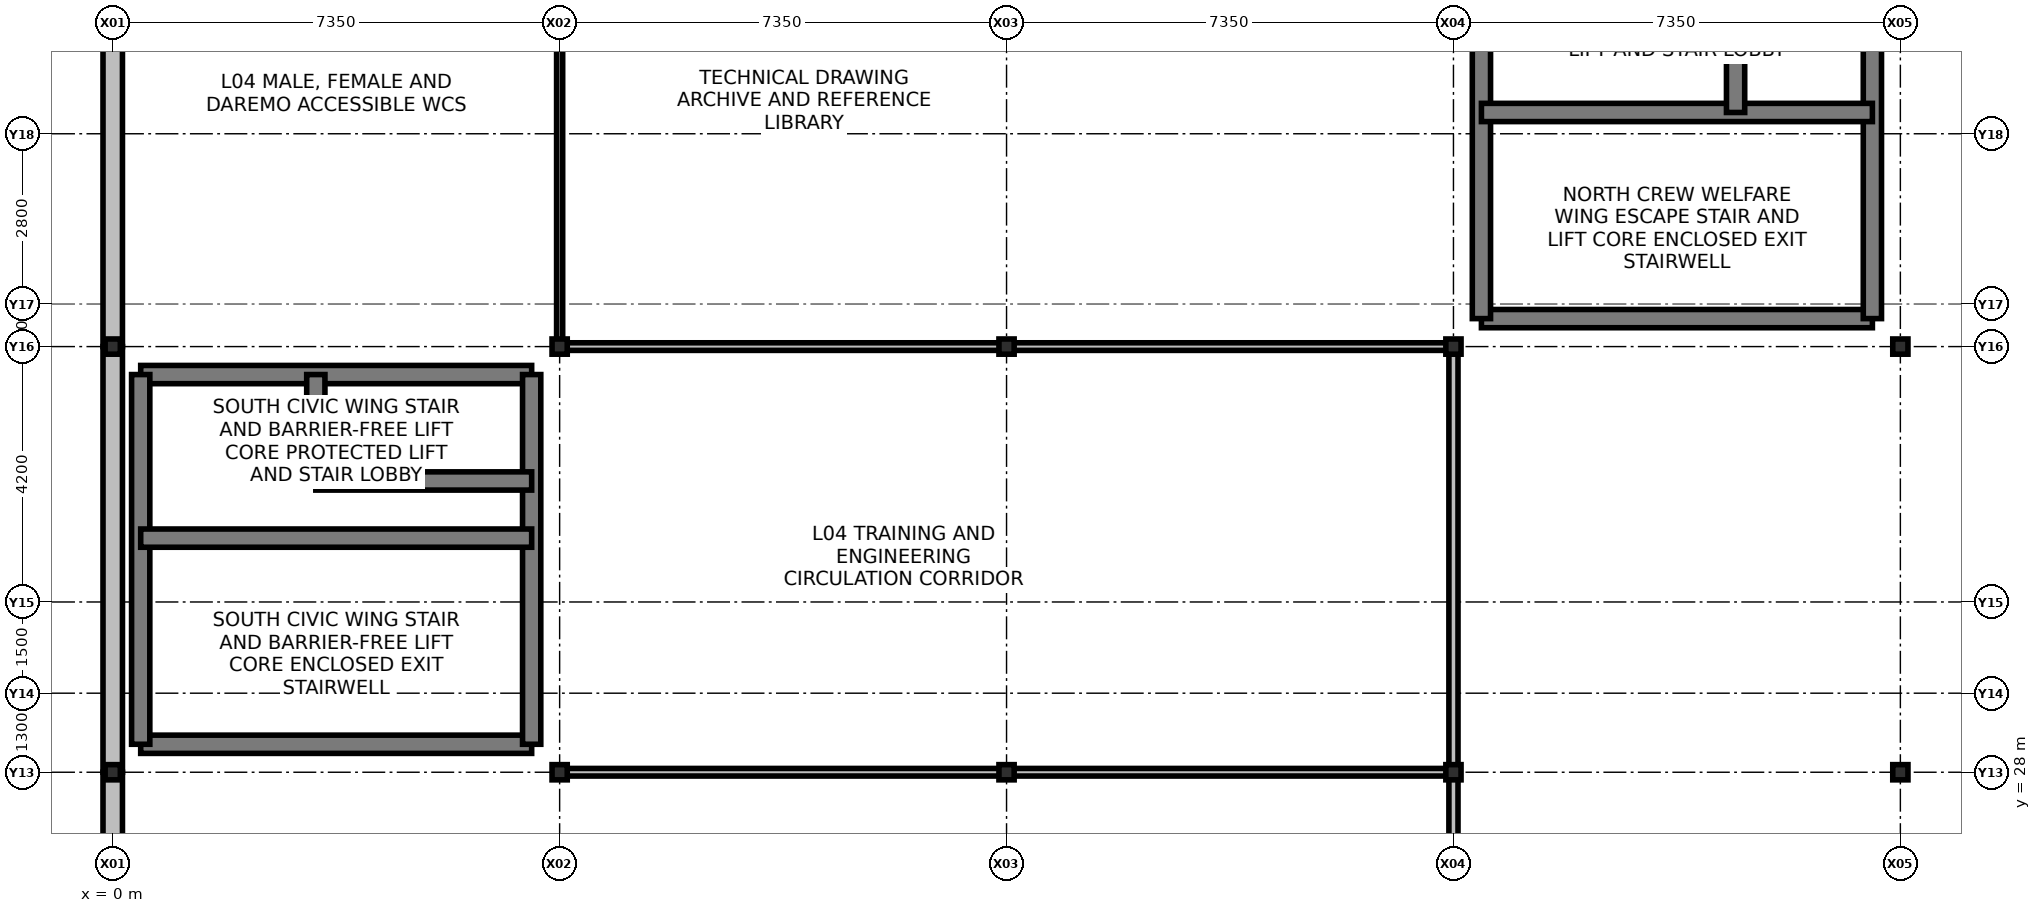
"""IFC4 building model, lengths in metres.
Left out: names, types, materials, properties, quantities, classifications, styles, units other than length and angle.
Written with IfcOpenShell. Run it as: python <this file> out.ifc"""

import sys

from ifc_helpers import new_model, si_unit, direction, frame, frame_2d, origin, origin_2d, place, context, subcontext, project, spatial, rectangle, i_section, extrude, element, fill, save


model = new_model("IFC4")
c1 = context("Model", 3, precision=1e-05, world=origin(), true_north=direction((0.0, 1.0)))
c2 = subcontext(c1, "Body", "Model", "MODEL_VIEW")
j1 = project(units=[si_unit("LENGTHUNIT", "METRE"), si_unit("PLANEANGLEUNIT", "RADIAN")], contexts=[c1])
p1 = place(None, origin())
s1 = spatial("IfcSite", under=j1, at=p1, CompositionType="ELEMENT")
p2 = place(p1, origin())
s2 = spatial("IfcBuilding", under=s1, at=p2, CompositionType="ELEMENT")
p3 = place(p2, frame((0.0, 0.0, 15.3)))
s3 = spatial("IfcBuildingStorey", under=s2, at=p3, CompositionType="ELEMENT", Elevation=15.3)
for number, where, z_axis, x_axis in (
    (1, (0.0, 28.0, 0.0), (0.0, 0.0, 1.0), (1.0, 0.0, 0.0)),
    (2, (0.0, 35.0, 0.0), (0.0, 0.0, 1.0), (1.0, 0.0, 0.0)),
    (3, (7.35, 28.0, 0.0), (0.0, 0.0, 1.0), (1.0, 0.0, 0.0)),
    (4, (7.35, 35.0, 0.0), (0.0, 0.0, 1.0), (1.0, 0.0, 0.0)),
    (5, (14.7, 28.0, 0.0), (0.0, 0.0, 1.0), (1.0, 0.0, 0.0)),
    (6, (14.7, 35.0, 0.0), (0.0, 0.0, 1.0), (1.0, 0.0, 0.0)),
    (7, (22.05, 28.0, 0.0), (0.0, 0.0, 1.0), (1.0, 0.0, 0.0)),
    (8, (22.05, 35.0, 0.0), (0.0, 0.0, 1.0), (1.0, 0.0, 0.0)),
    (9, (29.4, 28.0, 0.0), (0.0, 0.0, 1.0), (1.0, 0.0, 0.0)),
    (10, (29.4, 35.0, 0.0), (0.0, 0.0, 1.0), (1.0, 0.0, 0.0)),
):
    element("IfcColumn", number, at=place(p3, frame(where, z_axis=z_axis, x_axis=x_axis)), inside=s3, PredefinedType="COLUMN", context=c2, shape_type="SweptSolid", body=[
        extrude(i_section(OverallWidth=0.25, OverallDepth=0.25, WebThickness=0.009, FlangeThickness=0.014, at=origin_2d()), origin(), (0.0, 0.0, 1.0), 4.2),
    ])
p4 = place(p3, frame((0.0, 21.0, 0.0), z_axis=(0.0, 0.0, 1.0), x_axis=(0.0, 1.0, 0.0)))
e11 = element("IfcWall", 11, at=p4, inside=s3, PredefinedType="SOLIDWALL", context=c2, shape_type="SweptSolid", body=[
    extrude(rectangle(XDim=7.0, YDim=0.32, at=frame_2d((3.5, 0.0))), origin(), (0.0, 0.0, 1.0), 3.45),
])
p5 = place(p4, frame((2.2, 0.0, 0.9)))
e12 = element("IfcOpeningElement", 12, at=p5, cuts=e11, PredefinedType="OPENING", context=c2, shape_type="SweptSolid", body=[
    extrude(rectangle(XDim=2.0, YDim=1.8, at=frame_2d((1.0, 0.9))), frame((0.0, 0.17, 0.0), z_axis=(0.0, -1.0, 0.0), x_axis=(1.0, 0.0, 0.0)), (0.0, 0.0, 1.0), 0.34),
])
p6 = place(p3, frame((0.0, 28.0, 0.0), z_axis=(0.0, 0.0, 1.0), x_axis=(0.0, 1.0, 0.0)))
e13 = element("IfcWall", 13, at=p6, inside=s3, PredefinedType="SOLIDWALL", context=c2, shape_type="SweptSolid", body=[
    extrude(rectangle(XDim=7.0, YDim=0.32, at=frame_2d((3.5, 0.0))), origin(), (0.0, 0.0, 1.0), 3.45),
])
p7 = place(p6, frame((2.2, 0.0, 0.9)))
e14 = element("IfcOpeningElement", 14, at=p7, cuts=e13, PredefinedType="OPENING", context=c2, shape_type="SweptSolid", body=[
    extrude(rectangle(XDim=2.8, YDim=2.1, at=frame_2d((1.4, 1.05))), frame((0.0, 0.17, 0.0), z_axis=(0.0, -1.0, 0.0), x_axis=(1.0, 0.0, 0.0)), (0.0, 0.0, 1.0), 0.34),
])
p8 = place(p3, frame((0.0, 35.0, 0.0), z_axis=(0.0, 0.0, 1.0), x_axis=(0.0, 1.0, 0.0)))
e15 = element("IfcWall", 15, at=p8, inside=s3, PredefinedType="SOLIDWALL", context=c2, shape_type="SweptSolid", body=[
    extrude(rectangle(XDim=7.0, YDim=0.32, at=frame_2d((3.5, 0.0))), origin(), (0.0, 0.0, 1.0), 3.45),
])
p9 = place(p8, frame((2.2, 0.0, 0.9)))
e16 = element("IfcOpeningElement", 16, at=p9, cuts=e15, PredefinedType="OPENING", context=c2, shape_type="SweptSolid", body=[
    extrude(rectangle(XDim=1.35, YDim=1.65, at=frame_2d((0.675, 0.825))), frame((0.0, 0.17, 0.0), z_axis=(0.0, -1.0, 0.0), x_axis=(1.0, 0.0, 0.0)), (0.0, 0.0, 1.0), 0.34),
])
p10 = place(p3, frame((0.46, 28.46, 0.0), z_axis=(0.0, 0.0, 1.0), x_axis=(1.0, 0.0, 0.0)))
e17 = element("IfcWall", 17, at=p10, inside=s3, PredefinedType="SHEAR", context=c2, shape_type="SweptSolid", body=[
    extrude(rectangle(XDim=6.43, YDim=0.3, at=frame_2d((3.215, 0.0))), origin(), (0.0, 0.0, 1.0), 3.92),
])
p11 = place(p3, frame((0.46, 34.54, 0.0), z_axis=(0.0, 0.0, 1.0), x_axis=(1.0, 0.0, 0.0)))
e18 = element("IfcWall", 18, at=p11, inside=s3, PredefinedType="SHEAR", context=c2, shape_type="SweptSolid", body=[
    extrude(rectangle(XDim=6.43, YDim=0.3, at=frame_2d((3.215, 0.0))), origin(), (0.0, 0.0, 1.0), 3.92),
])
p12 = place(p11, frame((0.55, 0.0, 0.0)))
e19 = element("IfcOpeningElement", 19, at=p12, cuts=e18, PredefinedType="OPENING", context=c2, shape_type="SweptSolid", body=[
    extrude(rectangle(XDim=1.5, YDim=2.2, at=frame_2d((0.75, 1.1))), frame((0.0, 0.16, 0.0), z_axis=(0.0, -1.0, 0.0), x_axis=(1.0, 0.0, 0.0)), (0.0, 0.0, 1.0), 0.32),
])
for number, where, z_axis, x_axis in (
    (20, (0.46, 28.46, 0.0), (0.0, 0.0, 1.0), (0.0, 1.0, 0.0)),
    (21, (6.89, 28.46, 0.0), (0.0, 0.0, 1.0), (0.0, 1.0, 0.0)),
):
    element("IfcWall", number, at=place(p3, frame(where, z_axis=z_axis, x_axis=x_axis)), inside=s3, PredefinedType="SHEAR", context=c2, shape_type="SweptSolid", body=[
        extrude(rectangle(XDim=6.08, YDim=0.3, at=frame_2d((3.04, 0.0))), origin(), (0.0, 0.0, 1.0), 3.92),
    ])
p13 = place(p3, frame((0.46, 31.85, 0.0), z_axis=(0.0, 0.0, 1.0), x_axis=(1.0, 0.0, 0.0)))
e22 = element("IfcWall", 22, at=p13, inside=s3, PredefinedType="SHEAR", context=c2, shape_type="SweptSolid", body=[
    extrude(rectangle(XDim=6.43, YDim=0.3, at=frame_2d((3.215, 0.0))), origin(), (0.0, 0.0, 1.0), 3.92),
])
p14 = place(p13, frame((0.185, 0.0, 0.0)))
e23 = element("IfcOpeningElement", 23, at=p14, cuts=e22, PredefinedType="OPENING", context=c2, shape_type="SweptSolid", body=[
    extrude(rectangle(XDim=1.05, YDim=2.15, at=frame_2d((0.525, 1.075))), frame((0.0, 0.16, 0.0), z_axis=(0.0, -1.0, 0.0), x_axis=(1.0, 0.0, 0.0)), (0.0, 0.0, 1.0), 0.32),
])
p15 = place(p3, frame((3.34, 32.79, 0.0), z_axis=(0.0, 0.0, 1.0), x_axis=(0.0, 1.0, 0.0)))
e24 = element("IfcWall", 24, at=p15, inside=s3, PredefinedType="SHEAR", context=c2, shape_type="SweptSolid", body=[
    extrude(rectangle(XDim=1.75, YDim=0.3, at=frame_2d((0.875, 0.0))), origin(), (0.0, 0.0, 1.0), 3.92),
])
p16 = place(p3, frame((3.34, 32.79, 0.0), z_axis=(0.0, 0.0, 1.0), x_axis=(1.0, 0.0, 0.0)))
e25 = element("IfcWall", 25, at=p16, inside=s3, PredefinedType="SHEAR", context=c2, shape_type="SweptSolid", body=[
    extrude(rectangle(XDim=3.55, YDim=0.3, at=frame_2d((1.775, 0.0))), origin(), (0.0, 0.0, 1.0), 3.92),
])
p17 = place(p16, frame((0.25, 0.0, 0.0)))
e26 = element("IfcOpeningElement", 26, at=p17, cuts=e25, PredefinedType="OPENING", context=c2, shape_type="SweptSolid", body=[
    extrude(rectangle(XDim=1.1, YDim=2.15, at=frame_2d((0.55, 1.075))), frame((0.0, 0.16, 0.0), z_axis=(0.0, -1.0, 0.0), x_axis=(1.0, 0.0, 0.0)), (0.0, 0.0, 1.0), 0.32),
])
p18 = place(p16, frame((1.75, 0.0, 0.0)))
e27 = element("IfcOpeningElement", 27, at=p18, cuts=e25, PredefinedType="OPENING", context=c2, shape_type="SweptSolid", body=[
    extrude(rectangle(XDim=1.2, YDim=2.2, at=frame_2d((0.6, 1.1))), frame((0.0, 0.16, 0.0), z_axis=(0.0, -1.0, 0.0), x_axis=(1.0, 0.0, 0.0)), (0.0, 0.0, 1.0), 0.32),
])
p19 = place(p3, frame((22.51, 35.46, 0.0), z_axis=(0.0, 0.0, 1.0), x_axis=(1.0, 0.0, 0.0)))
e28 = element("IfcWall", 28, at=p19, inside=s3, PredefinedType="SHEAR", context=c2, shape_type="SweptSolid", body=[
    extrude(rectangle(XDim=6.43, YDim=0.3, at=frame_2d((3.215, 0.0))), origin(), (0.0, 0.0, 1.0), 3.92),
])
for number, where, z_axis, x_axis in (
    (29, (22.51, 35.46, 0.0), (0.0, 0.0, 1.0), (0.0, 1.0, 0.0)),
    (30, (28.94, 35.46, 0.0), (0.0, 0.0, 1.0), (0.0, 1.0, 0.0)),
):
    element("IfcWall", number, at=place(p3, frame(where, z_axis=z_axis, x_axis=x_axis)), inside=s3, PredefinedType="SHEAR", context=c2, shape_type="SweptSolid", body=[
        extrude(rectangle(XDim=6.08, YDim=0.3, at=frame_2d((3.04, 0.0))), origin(), (0.0, 0.0, 1.0), 3.92),
    ])
p20 = place(p3, frame((22.51, 38.85, 0.0), z_axis=(0.0, 0.0, 1.0), x_axis=(1.0, 0.0, 0.0)))
e31 = element("IfcWall", 31, at=p20, inside=s3, PredefinedType="SHEAR", context=c2, shape_type="SweptSolid", body=[
    extrude(rectangle(XDim=6.43, YDim=0.3, at=frame_2d((3.215, 0.0))), origin(), (0.0, 0.0, 1.0), 3.92),
])
p21 = place(p20, frame((0.185, 0.0, 0.0)))
e32 = element("IfcOpeningElement", 32, at=p21, cuts=e31, PredefinedType="OPENING", context=c2, shape_type="SweptSolid", body=[
    extrude(rectangle(XDim=1.05, YDim=2.15, at=frame_2d((0.525, 1.075))), frame((0.0, 0.16, 0.0), z_axis=(0.0, -1.0, 0.0), x_axis=(1.0, 0.0, 0.0)), (0.0, 0.0, 1.0), 0.32),
])
p22 = place(p3, frame((26.69, 38.85, 0.0), z_axis=(0.0, 0.0, 1.0), x_axis=(0.0, 1.0, 0.0)))
e33 = element("IfcWall", 33, at=p22, inside=s3, PredefinedType="SHEAR", context=c2, shape_type="SweptSolid", body=[
    extrude(rectangle(XDim=2.69, YDim=0.3, at=frame_2d((1.345, 0.0))), origin(), (0.0, 0.0, 1.0), 3.92),
])
p23 = place(p22, frame((0.4, 0.0, 0.0)))
e34 = element("IfcOpeningElement", 34, at=p23, cuts=e33, PredefinedType="OPENING", context=c2, shape_type="SweptSolid", body=[
    extrude(rectangle(XDim=1.1, YDim=2.15, at=frame_2d((0.55, 1.075))), frame((0.0, 0.16, 0.0), z_axis=(0.0, -1.0, 0.0), x_axis=(1.0, 0.0, 0.0)), (0.0, 0.0, 1.0), 0.32),
])
p24 = place(p3, frame((22.05, 14.0, 0.0), z_axis=(0.0, 0.0, 1.0), x_axis=(0.0, 1.0, 0.0)))
e35 = element("IfcWall", 35, at=p24, inside=s3, PredefinedType="PARTITIONING", context=c2, shape_type="SweptSolid", body=[
    extrude(rectangle(XDim=21.0, YDim=0.15, at=frame_2d((10.5, 0.0))), origin(), (0.0, 0.0, 1.0), 3.2),
])
p25 = place(p24, frame((4.0, 0.0, 0.0)))
e36 = element("IfcOpeningElement", 36, at=p25, cuts=e35, PredefinedType="OPENING", context=c2, shape_type="SweptSolid", body=[
    extrude(rectangle(XDim=1.25, YDim=2.15, at=frame_2d((0.625, 1.075))), frame((0.0, 0.085, 0.0), z_axis=(0.0, -1.0, 0.0), x_axis=(1.0, 0.0, 0.0)), (0.0, 0.0, 1.0), 0.17),
])
p26 = place(p24, frame((17.5, 0.0, 0.0)))
e37 = element("IfcOpeningElement", 37, at=p26, cuts=e35, PredefinedType="OPENING", context=c2, shape_type="SweptSolid", body=[
    extrude(rectangle(XDim=1.15, YDim=2.15, at=frame_2d((0.575, 1.075))), frame((0.0, 0.085, 0.0), z_axis=(0.0, -1.0, 0.0), x_axis=(1.0, 0.0, 0.0)), (0.0, 0.0, 1.0), 0.17),
])
p27 = place(p3, frame((7.35, 28.0, 0.0), z_axis=(0.0, 0.0, 1.0), x_axis=(1.0, 0.0, 0.0)))
e38 = element("IfcWall", 38, at=p27, inside=s3, PredefinedType="PARTITIONING", context=c2, shape_type="SweptSolid", body=[
    extrude(rectangle(XDim=14.7, YDim=0.125, at=frame_2d((7.35, 0.0))), origin(), (0.0, 0.0, 1.0), 3.2),
])
p28 = place(p27, frame((4.0, 0.0, 0.0)))
e39 = element("IfcOpeningElement", 39, at=p28, cuts=e38, PredefinedType="OPENING", context=c2, shape_type="SweptSolid", body=[
    extrude(rectangle(XDim=1.35, YDim=2.2, at=frame_2d((0.675, 1.1))), frame((0.0, 0.072, 0.0), z_axis=(0.0, -1.0, 0.0), x_axis=(1.0, 0.0, 0.0)), (0.0, 0.0, 1.0), 0.145),
])
p29 = place(p3, frame((7.35, 35.0, 0.0), z_axis=(0.0, 0.0, 1.0), x_axis=(1.0, 0.0, 0.0)))
e40 = element("IfcWall", 40, at=p29, inside=s3, PredefinedType="PARTITIONING", context=c2, shape_type="SweptSolid", body=[
    extrude(rectangle(XDim=14.7, YDim=0.125, at=frame_2d((7.35, 0.0))), origin(), (0.0, 0.0, 1.0), 3.2),
])
p30 = place(p29, frame((4.0, 0.0, 0.0)))
e41 = element("IfcOpeningElement", 41, at=p30, cuts=e40, PredefinedType="OPENING", context=c2, shape_type="SweptSolid", body=[
    extrude(rectangle(XDim=1.1, YDim=2.1, at=frame_2d((0.55, 1.05))), frame((0.0, 0.072, 0.0), z_axis=(0.0, -1.0, 0.0), x_axis=(1.0, 0.0, 0.0)), (0.0, 0.0, 1.0), 0.145),
])
p31 = place(p3, frame((7.35, 35.0, 0.0), z_axis=(0.0, 0.0, 1.0), x_axis=(0.0, 1.0, 0.0)))
e42 = element("IfcWall", 42, at=p31, inside=s3, PredefinedType="PARTITIONING", context=c2, shape_type="SweptSolid", body=[
    extrude(rectangle(XDim=14.0, YDim=0.1, at=frame_2d((7.0, 0.0))), origin(), (0.0, 0.0, 1.0), 3.2),
])
p32 = place(p31, frame((3.5, 0.0, 0.0)))
e43 = element("IfcOpeningElement", 43, at=p32, cuts=e42, PredefinedType="OPENING", context=c2, shape_type="SweptSolid", body=[
    extrude(rectangle(XDim=0.9, YDim=2.1, at=frame_2d((0.45, 1.05))), frame((0.0, 0.06, 0.0), z_axis=(0.0, -1.0, 0.0), x_axis=(1.0, 0.0, 0.0)), (0.0, 0.0, 1.0), 0.12),
])
p33 = place(p31, frame((9.5, 0.0, 0.0)))
e44 = element("IfcOpeningElement", 44, at=p33, cuts=e42, PredefinedType="OPENING", context=c2, shape_type="SweptSolid", body=[
    extrude(rectangle(XDim=0.95, YDim=2.2, at=frame_2d((0.475, 1.1))), frame((0.0, 0.06, 0.0), z_axis=(0.0, -1.0, 0.0), x_axis=(1.0, 0.0, 0.0)), (0.0, 0.0, 1.0), 0.12),
])
p34 = place(p7, origin())
e45 = element("IfcWindow", 45, at=p34, inside=s3, PartitioningType="SINGLE_PANEL", PredefinedType="WINDOW", context=c2, shape_type="SweptSolid", body=[
    extrude(rectangle(XDim=2.8, YDim=2.1, at=frame_2d((1.4, 1.05))), frame((0.0, 0.03, 0.0), z_axis=(0.0, -1.0, 0.0), x_axis=(1.0, 0.0, 0.0)), (0.0, 0.0, 1.0), 0.06),
])
fill(e14, e45)
p35 = place(p9, origin())
e46 = element("IfcWindow", 46, at=p35, inside=s3, PartitioningType="SINGLE_PANEL", PredefinedType="WINDOW", context=c2, shape_type="SweptSolid", body=[
    extrude(rectangle(XDim=1.35, YDim=1.65, at=frame_2d((0.675, 0.825))), frame((0.0, 0.03, 0.0), z_axis=(0.0, -1.0, 0.0), x_axis=(1.0, 0.0, 0.0)), (0.0, 0.0, 1.0), 0.06),
])
fill(e16, e46)
p36 = place(p14, origin())
e47 = element("IfcDoor", 47, at=p36, inside=s3, OperationType="SINGLE_SWING_RIGHT", PredefinedType="DOOR", context=c2, shape_type="SweptSolid", body=[
    extrude(rectangle(XDim=1.05, YDim=2.15, at=frame_2d((0.525, 1.075))), frame((0.0, 0.025, 0.0), z_axis=(0.0, -1.0, 0.0), x_axis=(1.0, 0.0, 0.0)), (0.0, 0.0, 1.0), 0.05),
])
fill(e23, e47)
p37 = place(p12, origin())
e48 = element("IfcDoor", 48, at=p37, inside=s3, OperationType="DOUBLE_DOOR_SINGLE_SWING", PredefinedType="DOOR", context=c2, shape_type="SweptSolid", body=[
    extrude(rectangle(XDim=1.5, YDim=2.2, at=frame_2d((0.75, 1.1))), frame((0.0, 0.025, 0.0), z_axis=(0.0, -1.0, 0.0), x_axis=(1.0, 0.0, 0.0)), (0.0, 0.0, 1.0), 0.05),
])
fill(e19, e48)
p38 = place(p17, origin())
e49 = element("IfcDoor", 49, at=p38, inside=s3, OperationType="SLIDING_TO_LEFT", PredefinedType="DOOR", context=c2, shape_type="SweptSolid", body=[
    extrude(rectangle(XDim=1.1, YDim=2.15, at=frame_2d((0.55, 1.075))), frame((0.0, 0.025, 0.0), z_axis=(0.0, -1.0, 0.0), x_axis=(1.0, 0.0, 0.0)), (0.0, 0.0, 1.0), 0.05),
])
fill(e26, e49)
p39 = place(p18, origin())
e50 = element("IfcDoor", 50, at=p39, inside=s3, OperationType="SLIDING_TO_RIGHT", PredefinedType="DOOR", context=c2, shape_type="SweptSolid", body=[
    extrude(rectangle(XDim=1.2, YDim=2.2, at=frame_2d((0.6, 1.1))), frame((0.0, 0.025, 0.0), z_axis=(0.0, -1.0, 0.0), x_axis=(1.0, 0.0, 0.0)), (0.0, 0.0, 1.0), 0.05),
])
fill(e27, e50)
p40 = place(p21, origin())
e51 = element("IfcDoor", 51, at=p40, inside=s3, OperationType="SINGLE_SWING_RIGHT", PredefinedType="DOOR", context=c2, shape_type="SweptSolid", body=[
    extrude(rectangle(XDim=1.05, YDim=2.15, at=frame_2d((0.525, 1.075))), frame((0.0, 0.025, 0.0), z_axis=(0.0, -1.0, 0.0), x_axis=(1.0, 0.0, 0.0)), (0.0, 0.0, 1.0), 0.05),
])
fill(e32, e51)
p41 = place(p23, origin())
e52 = element("IfcDoor", 52, at=p41, inside=s3, OperationType="SLIDING_TO_RIGHT", PredefinedType="DOOR", context=c2, shape_type="SweptSolid", body=[
    extrude(rectangle(XDim=1.1, YDim=2.15, at=frame_2d((0.55, 1.075))), frame((0.0, 0.025, 0.0), z_axis=(0.0, -1.0, 0.0), x_axis=(1.0, 0.0, 0.0)), (0.0, 0.0, 1.0), 0.05),
])
fill(e34, e52)
p42 = place(p26, origin())
e53 = element("IfcDoor", 53, at=p42, inside=s3, OperationType="SINGLE_SWING_RIGHT", PredefinedType="DOOR", context=c2, shape_type="SweptSolid", body=[
    extrude(rectangle(XDim=1.15, YDim=2.15, at=frame_2d((0.575, 1.075))), frame((0.0, 0.025, 0.0), z_axis=(0.0, -1.0, 0.0), x_axis=(1.0, 0.0, 0.0)), (0.0, 0.0, 1.0), 0.05),
])
fill(e37, e53)
p43 = place(p28, origin())
e54 = element("IfcDoor", 54, at=p43, inside=s3, OperationType="DOUBLE_DOOR_SINGLE_SWING", PredefinedType="DOOR", context=c2, shape_type="SweptSolid", body=[
    extrude(rectangle(XDim=1.35, YDim=2.2, at=frame_2d((0.675, 1.1))), frame((0.0, 0.025, 0.0), z_axis=(0.0, -1.0, 0.0), x_axis=(1.0, 0.0, 0.0)), (0.0, 0.0, 1.0), 0.05),
])
fill(e39, e54)
p44 = place(p30, origin())
e55 = element("IfcDoor", 55, at=p44, inside=s3, OperationType="SINGLE_SWING_RIGHT", PredefinedType="DOOR", context=c2, shape_type="SweptSolid", body=[
    extrude(rectangle(XDim=1.1, YDim=2.1, at=frame_2d((0.55, 1.05))), frame((0.0, 0.025, 0.0), z_axis=(0.0, -1.0, 0.0), x_axis=(1.0, 0.0, 0.0)), (0.0, 0.0, 1.0), 0.05),
])
fill(e41, e55)
p45 = place(p32, origin())
e56 = element("IfcDoor", 56, at=p45, inside=s3, OperationType="SINGLE_SWING_RIGHT", PredefinedType="DOOR", context=c2, shape_type="SweptSolid", body=[
    extrude(rectangle(XDim=0.9, YDim=2.1, at=frame_2d((0.45, 1.05))), frame((0.0, 0.025, 0.0), z_axis=(0.0, -1.0, 0.0), x_axis=(1.0, 0.0, 0.0)), (0.0, 0.0, 1.0), 0.05),
])
fill(e43, e56)
save(model, sys.argv[1])
